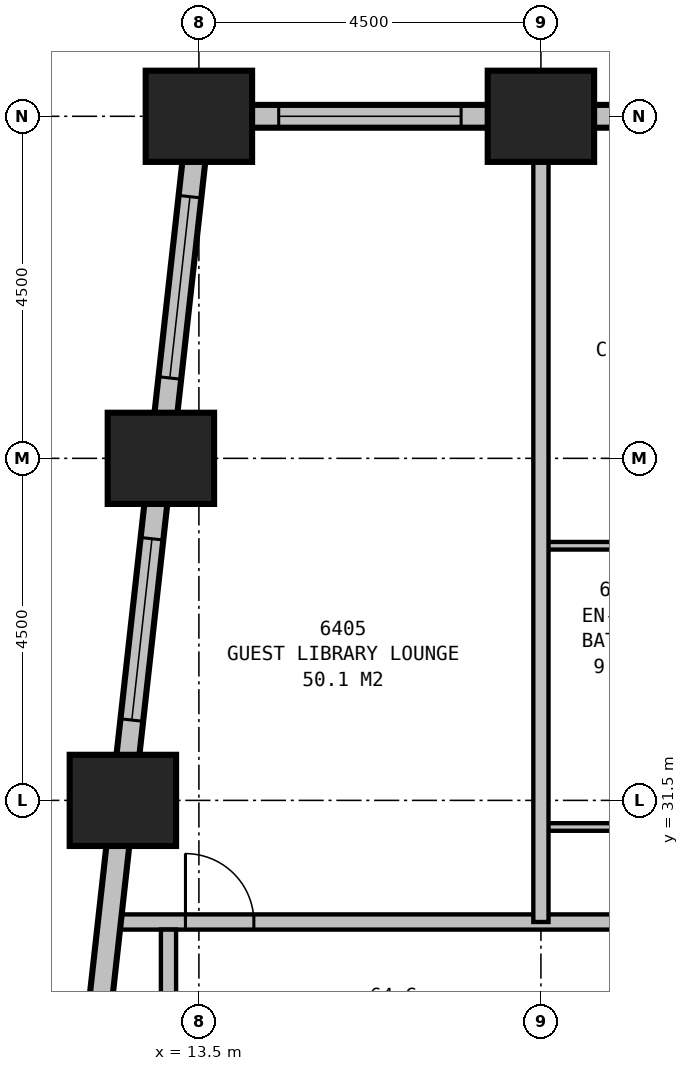
"""IFC4 building model, lengths in metres.
Left out: names, types, materials, properties, quantities, classifications, styles, units other than length and angle.
Written with IfcOpenShell. Run it as: python <this file> out.ifc"""

import sys

from ifc_helpers import new_model, si_unit, direction, frame, frame_2d, origin, origin_2d, place, context, subcontext, project, spatial, rectangle, extrude, element, fill, save


model = new_model("IFC4")
c1 = context("Model", 3, precision=1e-05, world=origin(), true_north=direction((0.0, 1.0)))
c2 = subcontext(c1, "Body", "Model", "MODEL_VIEW")
j1 = project(units=[si_unit("LENGTHUNIT", "METRE"), si_unit("PLANEANGLEUNIT", "RADIAN")], contexts=[c1])
p1 = place(None, origin())
s1 = spatial("IfcSite", under=j1, at=p1, CompositionType="ELEMENT")
p2 = place(p1, origin())
s2 = spatial("IfcBuilding", under=s1, at=p2, CompositionType="ELEMENT")
p3 = place(p2, frame((0.0, 0.0, 250.7)))
s3 = spatial("IfcBuildingStorey", under=s2, at=p3, CompositionType="ELEMENT", Elevation=250.7)
for number, where, z_axis, x_axis in (
    (1, (18.0, 40.5, 0.0), (0.0, 0.0, 1.0), (1.0, 0.0, 0.0)),
    (2, (13.5, 40.5, 0.0), (0.0, 0.0, 1.0), (1.0, 0.0, 0.0)),
    (3, (13.0, 36.0, 0.0), (0.0, 0.0, 1.0), (1.0, 0.0, 0.0)),
    (4, (12.5, 31.5, 0.0), (0.0, 0.0, 1.0), (1.0, 0.0, 0.0)),
):
    element("IfcColumn", number, at=place(p3, frame(where, z_axis=z_axis, x_axis=x_axis)), inside=s3, PredefinedType="COLUMN", context=c2, shape_type="SweptSolid", body=[
        extrude(rectangle(XDim=1.4, YDim=1.2, at=origin_2d()), origin(), (0.0, 0.0, 1.0), 3.9),
    ])
p4 = place(p3, frame((40.65, 40.5, 0.0), z_axis=(0.0, 0.0, 1.0), x_axis=(-1.0, 0.0, 0.0)))
e5 = element("IfcWall", 5, at=p4, inside=s3, PredefinedType="STANDARD", context=c2, shape_type="SweptSolid", body=[
    extrude(rectangle(XDim=27.3, YDim=0.3, at=frame_2d((13.65, 0.0))), origin(), (0.0, 0.0, 1.0), 2.65),
])
p5 = place(p4, frame((1.2, 0.0, 0.5)))
e6 = element("IfcOpeningElement", 6, at=p5, cuts=e5, PredefinedType="OPENING", context=c2, shape_type="SweptSolid", body=[
    extrude(rectangle(XDim=2.4, YDim=2.0, at=frame_2d((1.2, 1.0))), frame((0.0, 0.16, 0.0), z_axis=(0.0, -1.0, 0.0), x_axis=(1.0, 0.0, 0.0)), (0.0, 0.0, 1.0), 0.32),
])
p6 = place(p4, frame((5.7, 0.0, 0.5)))
e7 = element("IfcOpeningElement", 7, at=p6, cuts=e5, PredefinedType="OPENING", context=c2, shape_type="SweptSolid", body=[
    extrude(rectangle(XDim=2.4, YDim=2.0, at=frame_2d((1.2, 1.0))), frame((0.0, 0.16, 0.0), z_axis=(0.0, -1.0, 0.0), x_axis=(1.0, 0.0, 0.0)), (0.0, 0.0, 1.0), 0.32),
])
p7 = place(p4, frame((10.2, 0.0, 0.5)))
e8 = element("IfcOpeningElement", 8, at=p7, cuts=e5, PredefinedType="OPENING", context=c2, shape_type="SweptSolid", body=[
    extrude(rectangle(XDim=2.4, YDim=2.0, at=frame_2d((1.2, 1.0))), frame((0.0, 0.16, 0.0), z_axis=(0.0, -1.0, 0.0), x_axis=(1.0, 0.0, 0.0)), (0.0, 0.0, 1.0), 0.32),
])
p8 = place(p4, frame((14.7, 0.0, 0.5)))
e9 = element("IfcOpeningElement", 9, at=p8, cuts=e5, PredefinedType="OPENING", context=c2, shape_type="SweptSolid", body=[
    extrude(rectangle(XDim=2.4, YDim=2.0, at=frame_2d((1.2, 1.0))), frame((0.0, 0.16, 0.0), z_axis=(0.0, -1.0, 0.0), x_axis=(1.0, 0.0, 0.0)), (0.0, 0.0, 1.0), 0.32),
])
p9 = place(p4, frame((19.2, 0.0, 0.5)))
e10 = element("IfcOpeningElement", 10, at=p9, cuts=e5, PredefinedType="OPENING", context=c2, shape_type="SweptSolid", body=[
    extrude(rectangle(XDim=2.4, YDim=2.0, at=frame_2d((1.2, 1.0))), frame((0.0, 0.16, 0.0), z_axis=(0.0, -1.0, 0.0), x_axis=(1.0, 0.0, 0.0)), (0.0, 0.0, 1.0), 0.32),
])
p10 = place(p4, frame((23.7, 0.0, 0.5)))
e11 = element("IfcOpeningElement", 11, at=p10, cuts=e5, PredefinedType="OPENING", context=c2, shape_type="SweptSolid", body=[
    extrude(rectangle(XDim=2.4, YDim=2.0, at=frame_2d((1.2, 1.0))), frame((0.0, 0.16, 0.0), z_axis=(0.0, -1.0, 0.0), x_axis=(1.0, 0.0, 0.0)), (0.0, 0.0, 1.0), 0.32),
])
p11 = place(p3, frame((13.517, 40.649, 0.0), z_axis=(0.0, 0.0, 1.0), x_axis=(-0.110433201132, -0.993883548555, 0.0)))
e12 = element("IfcWall", 12, at=p11, inside=s3, PredefinedType="STANDARD", context=c2, shape_type="SweptSolid", body=[
    extrude(rectangle(XDim=31.994, YDim=0.3, at=frame_2d((15.997, 0.0))), origin(), (0.0, 0.0, 1.0), 2.65),
])
p12 = place(p11, frame((1.214, 0.0, 0.5)))
e13 = element("IfcOpeningElement", 13, at=p12, cuts=e12, PredefinedType="OPENING", context=c2, shape_type="SweptSolid", body=[
    extrude(rectangle(XDim=2.4, YDim=2.0, at=frame_2d((1.2, 1.0))), frame((0.0, 0.16, 0.0), z_axis=(0.0, -1.0, 0.0), x_axis=(1.0, 0.0, 0.0)), (0.0, 0.0, 1.0), 0.32),
])
p13 = place(p11, frame((5.742, 0.0, 0.5)))
e14 = element("IfcOpeningElement", 14, at=p13, cuts=e12, PredefinedType="OPENING", context=c2, shape_type="SweptSolid", body=[
    extrude(rectangle(XDim=2.4, YDim=2.0, at=frame_2d((1.2, 1.0))), frame((0.0, 0.16, 0.0), z_axis=(0.0, -1.0, 0.0), x_axis=(1.0, 0.0, 0.0)), (0.0, 0.0, 1.0), 0.32),
])
p14 = place(p11, frame((14.797, 0.0, 0.5)))
e15 = element("IfcOpeningElement", 15, at=p14, cuts=e12, PredefinedType="OPENING", context=c2, shape_type="SweptSolid", body=[
    extrude(rectangle(XDim=2.4, YDim=2.0, at=frame_2d((1.2, 1.0))), frame((0.0, 0.16, 0.0), z_axis=(0.0, -1.0, 0.0), x_axis=(1.0, 0.0, 0.0)), (0.0, 0.0, 1.0), 0.32),
])
p15 = place(p11, frame((19.325, 0.0, 0.5)))
e16 = element("IfcOpeningElement", 16, at=p15, cuts=e12, PredefinedType="OPENING", context=c2, shape_type="SweptSolid", body=[
    extrude(rectangle(XDim=2.4, YDim=2.0, at=frame_2d((1.2, 1.0))), frame((0.0, 0.16, 0.0), z_axis=(0.0, -1.0, 0.0), x_axis=(1.0, 0.0, 0.0)), (0.0, 0.0, 1.0), 0.32),
])
p16 = place(p11, frame((23.852, 0.0, 0.5)))
e17 = element("IfcOpeningElement", 17, at=p16, cuts=e12, PredefinedType="OPENING", context=c2, shape_type="SweptSolid", body=[
    extrude(rectangle(XDim=2.4, YDim=2.0, at=frame_2d((1.2, 1.0))), frame((0.0, 0.16, 0.0), z_axis=(0.0, -1.0, 0.0), x_axis=(1.0, 0.0, 0.0)), (0.0, 0.0, 1.0), 0.32),
])
p17 = place(p11, frame((28.38, 0.0, 0.5)))
e18 = element("IfcOpeningElement", 18, at=p17, cuts=e12, PredefinedType="OPENING", context=c2, shape_type="SweptSolid", body=[
    extrude(rectangle(XDim=2.4, YDim=2.0, at=frame_2d((1.2, 1.0))), frame((0.0, 0.16, 0.0), z_axis=(0.0, -1.0, 0.0), x_axis=(1.0, 0.0, 0.0)), (0.0, 0.0, 1.0), 0.32),
])
p18 = place(p3, frame((12.473, 29.9, 0.0), z_axis=(0.0, 0.0, 1.0), x_axis=(1.0, 0.0, 0.0)))
e19 = element("IfcWall", 19, at=p18, inside=s3, PredefinedType="PARTITIONING", context=c2, shape_type="SweptSolid", body=[
    extrude(rectangle(XDim=25.827, YDim=0.2, at=frame_2d((12.914, 0.0))), origin(), (0.0, 0.0, 1.0), 3.65),
])
p19 = place(p18, frame((0.85, 0.0, 0.0)))
e20 = element("IfcOpeningElement", 20, at=p19, cuts=e19, PredefinedType="OPENING", context=c2, shape_type="SweptSolid", body=[
    extrude(rectangle(XDim=0.9, YDim=2.1, at=frame_2d((0.45, 1.05))), frame((0.0, 0.11, 0.0), z_axis=(0.0, -1.0, 0.0), x_axis=(1.0, 0.0, 0.0)), (0.0, 0.0, 1.0), 0.22),
])
p20 = place(p18, frame((8.677, 0.0, 0.0)))
e21 = element("IfcOpeningElement", 21, at=p20, cuts=e19, PredefinedType="OPENING", context=c2, shape_type="SweptSolid", body=[
    extrude(rectangle(XDim=0.9, YDim=2.1, at=frame_2d((0.45, 1.05))), frame((0.0, 0.11, 0.0), z_axis=(0.0, -1.0, 0.0), x_axis=(1.0, 0.0, 0.0)), (0.0, 0.0, 1.0), 0.22),
])
p21 = place(p18, frame((13.177, 0.0, 0.0)))
e22 = element("IfcOpeningElement", 22, at=p21, cuts=e19, PredefinedType="OPENING", context=c2, shape_type="SweptSolid", body=[
    extrude(rectangle(XDim=0.9, YDim=2.1, at=frame_2d((0.45, 1.05))), frame((0.0, 0.11, 0.0), z_axis=(0.0, -1.0, 0.0), x_axis=(1.0, 0.0, 0.0)), (0.0, 0.0, 1.0), 0.22),
])
p22 = place(p18, frame((17.677, 0.0, 0.0)))
e23 = element("IfcOpeningElement", 23, at=p22, cuts=e19, PredefinedType="OPENING", context=c2, shape_type="SweptSolid", body=[
    extrude(rectangle(XDim=0.9, YDim=2.1, at=frame_2d((0.45, 1.05))), frame((0.0, 0.11, 0.0), z_axis=(0.0, -1.0, 0.0), x_axis=(1.0, 0.0, 0.0)), (0.0, 0.0, 1.0), 0.22),
])
p23 = place(p18, frame((22.177, 0.0, 0.0)))
e24 = element("IfcOpeningElement", 24, at=p23, cuts=e19, PredefinedType="OPENING", context=c2, shape_type="SweptSolid", body=[
    extrude(rectangle(XDim=0.9, YDim=2.1, at=frame_2d((0.45, 1.05))), frame((0.0, 0.11, 0.0), z_axis=(0.0, -1.0, 0.0), x_axis=(1.0, 0.0, 0.0)), (0.0, 0.0, 1.0), 0.22),
])
p24 = place(p18, frame((24.227, 0.0, 0.0)))
e25 = element("IfcOpeningElement", 25, at=p24, cuts=e19, PredefinedType="OPENING", context=c2, shape_type="SweptSolid", body=[
    extrude(rectangle(XDim=0.9, YDim=2.1, at=frame_2d((0.45, 1.05))), frame((0.0, 0.11, 0.0), z_axis=(0.0, -1.0, 0.0), x_axis=(1.0, 0.0, 0.0)), (0.0, 0.0, 1.0), 0.22),
])
p25 = place(p3, frame((13.1, 27.3, 0.0), z_axis=(0.0, 0.0, 1.0), x_axis=(0.0, 1.0, 0.0)))
e26 = element("IfcWall", 26, at=p25, inside=s3, PredefinedType="PARTITIONING", context=c2, shape_type="SweptSolid", body=[
    extrude(rectangle(XDim=2.5, YDim=0.2, at=frame_2d((1.25, 0.0))), origin(), (0.0, 0.0, 1.0), 3.65),
])
p26 = place(p3, frame((18.0, 29.9, 0.0), z_axis=(0.0, 0.0, 1.0), x_axis=(0.0, 1.0, 0.0)))
e27 = element("IfcWall", 27, at=p26, inside=s3, PredefinedType="PARTITIONING", context=c2, shape_type="SweptSolid", body=[
    extrude(rectangle(XDim=10.6, YDim=0.2, at=frame_2d((5.3, 0.0))), origin(), (0.0, 0.0, 1.0), 2.65),
])
for number, where, z_axis, x_axis in (
    (28, (18.0, 31.15, 0.0), (0.0, 0.0, 1.0), (1.0, 0.0, 0.0)),
    (29, (18.0, 34.85, 0.0), (0.0, 0.0, 1.0), (1.0, 0.0, 0.0)),
):
    element("IfcWall", number, at=place(p3, frame(where, z_axis=z_axis, x_axis=x_axis)), inside=s3, PredefinedType="PLUMBINGWALL", context=c2, shape_type="SweptSolid", body=[
        extrude(rectangle(XDim=2.8, YDim=0.1, at=frame_2d((1.4, 0.0))), origin(), (0.0, 0.0, 1.0), 3.65),
    ])
p27 = place(p10, origin())
e30 = element("IfcWindow", 30, at=p27, inside=s3, PartitioningType="SINGLE_PANEL", PredefinedType="WINDOW", context=c2, shape_type="SweptSolid", body=[
    extrude(rectangle(XDim=2.4, YDim=2.0, at=frame_2d((1.2, 1.0))), frame((0.0, 0.03, 0.0), z_axis=(0.0, -1.0, 0.0), x_axis=(1.0, 0.0, 0.0)), (0.0, 0.0, 1.0), 0.06),
])
fill(e11, e30)
p28 = place(p12, origin())
e31 = element("IfcWindow", 31, at=p28, inside=s3, PartitioningType="SINGLE_PANEL", PredefinedType="WINDOW", context=c2, shape_type="SweptSolid", body=[
    extrude(rectangle(XDim=2.4, YDim=2.0, at=frame_2d((1.2, 1.0))), frame((0.0, 0.03, 0.0), z_axis=(0.0, -1.0, 0.0), x_axis=(1.0, 0.0, 0.0)), (0.0, 0.0, 1.0), 0.06),
])
fill(e13, e31)
p29 = place(p13, origin())
e32 = element("IfcWindow", 32, at=p29, inside=s3, PartitioningType="SINGLE_PANEL", PredefinedType="WINDOW", context=c2, shape_type="SweptSolid", body=[
    extrude(rectangle(XDim=2.4, YDim=2.0, at=frame_2d((1.2, 1.0))), frame((0.0, 0.03, 0.0), z_axis=(0.0, -1.0, 0.0), x_axis=(1.0, 0.0, 0.0)), (0.0, 0.0, 1.0), 0.06),
])
fill(e14, e32)
p30 = place(p19, origin())
e33 = element("IfcDoor", 33, at=p30, inside=s3, OperationType="SINGLE_SWING_LEFT", PredefinedType="DOOR", context=c2, shape_type="SweptSolid", body=[
    extrude(rectangle(XDim=0.9, YDim=2.1, at=frame_2d((0.45, 1.05))), frame((0.0, 0.025, 0.0), z_axis=(0.0, -1.0, 0.0), x_axis=(1.0, 0.0, 0.0)), (0.0, 0.0, 1.0), 0.05),
])
fill(e20, e33)
save(model, sys.argv[1])
